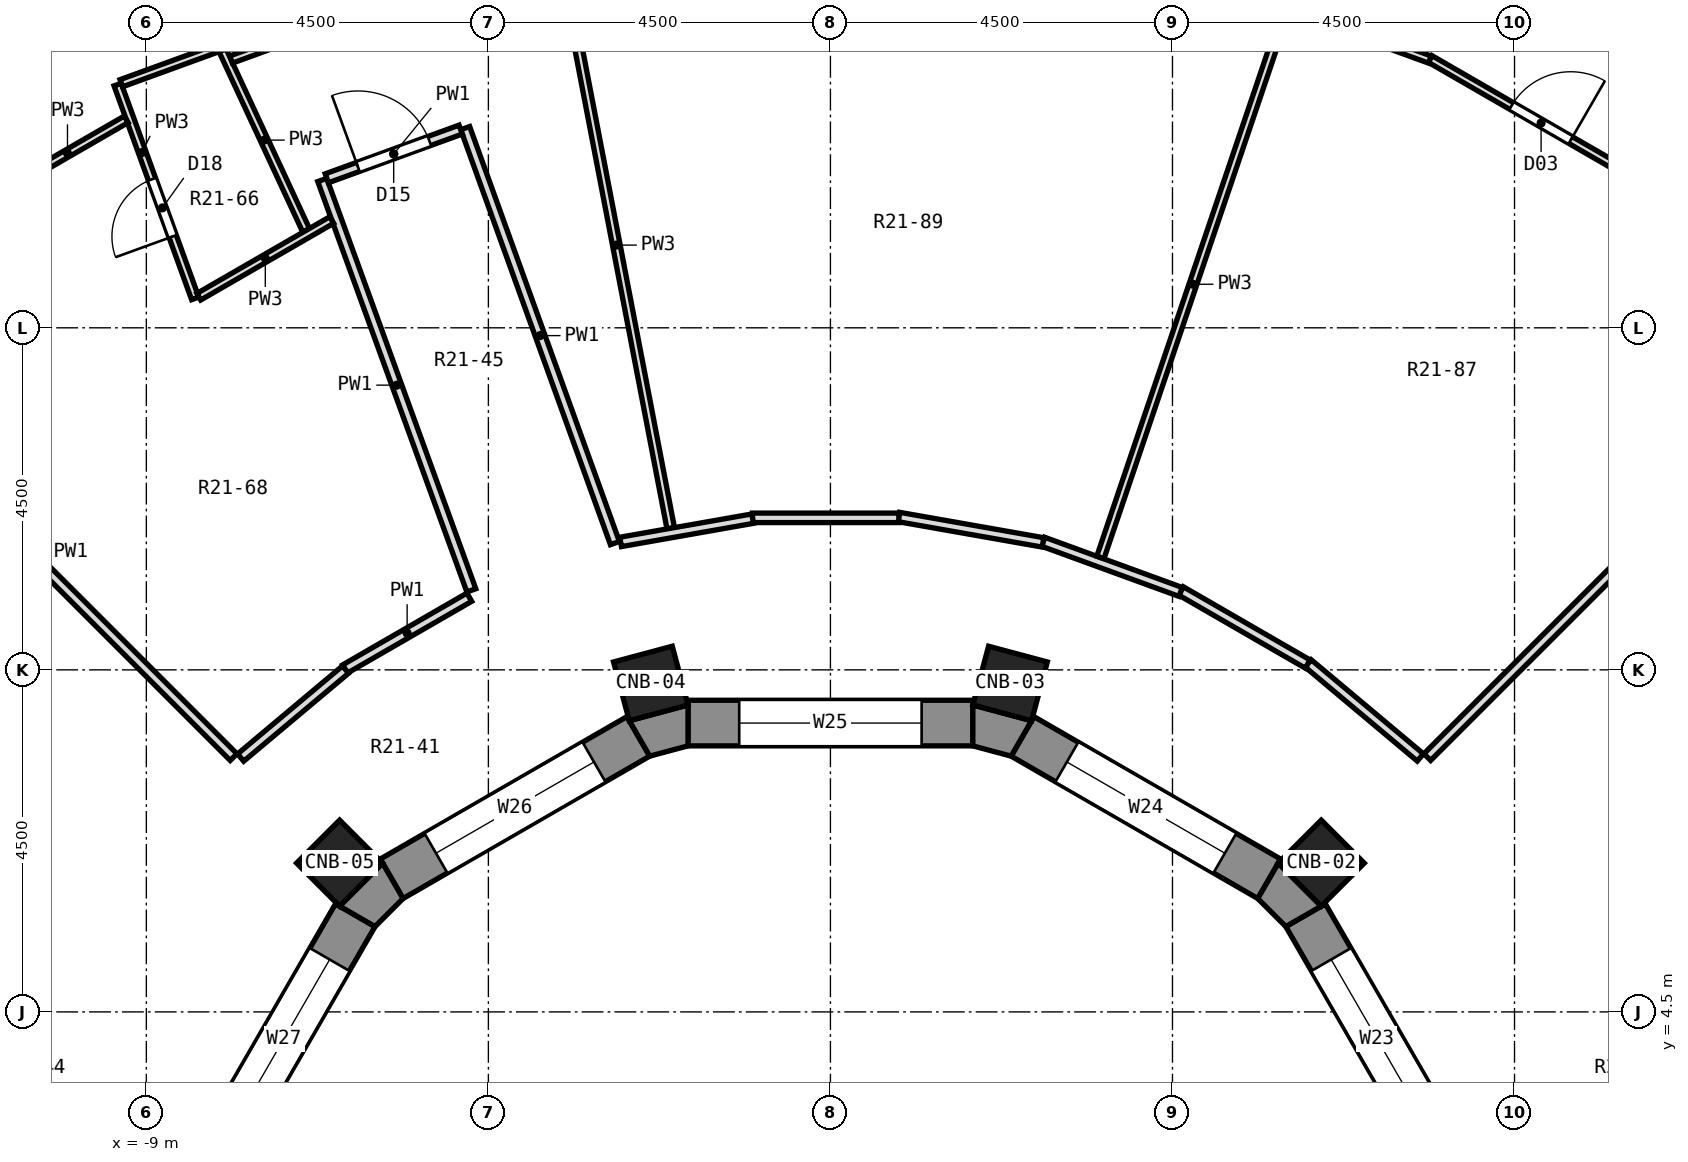
"""IFC4 building model, lengths in metres.
Left out: names, types, materials, properties, quantities, classifications, styles, units other than length and angle.
Written with IfcOpenShell. Run it as: python <this file> out.ifc"""

import sys

from ifc_helpers import new_model, si_unit, direction, frame, frame_2d, origin, origin_2d, place, context, subcontext, project, spatial, polyline, rectangle, outline, extrude, element, fill, save


model = new_model("IFC4")
c1 = context("Model", 3, precision=1e-05, world=origin(), true_north=direction((0.0, 1.0)))
c2 = subcontext(c1, "Body", "Model", "MODEL_VIEW")
j1 = project(units=[si_unit("LENGTHUNIT", "METRE"), si_unit("PLANEANGLEUNIT", "RADIAN")], contexts=[c1])
p1 = place(None, origin())
s1 = spatial("IfcSite", under=j1, at=p1, CompositionType="ELEMENT")
p2 = place(p1, origin())
s2 = spatial("IfcBuilding", under=s1, at=p2, CompositionType="ELEMENT")
p3 = place(p2, frame((0.0, 0.0, 131.5)))
s3 = spatial("IfcBuildingStorey", under=s2, at=p3, CompositionType="ELEMENT", Elevation=131.5)
for number, where, z_axis, x_axis in (
    (1, (6.458, 6.458, 0.0), (0.0, 0.0, 1.0), (0.707, 0.707, 0.0)),
    (2, (2.364, 8.821, 0.0), (0.0, 0.0, 1.0), (0.259, 0.966, 0.0)),
    (3, (-2.364, 8.821, 0.0), (0.0, 0.0, 1.0), (-0.259, 0.966, 0.0)),
    (4, (-6.458, 6.458, 0.0), (0.0, 0.0, 1.0), (-0.707, 0.707, 0.0)),
):
    element("IfcColumn", number, at=place(p3, frame(where, z_axis=z_axis, x_axis=x_axis)), inside=s3, PredefinedType="COLUMN", context=c2, shape_type="SweptSolid", body=[
        extrude(rectangle(XDim=0.8, YDim=0.8, at=origin_2d()), origin(), (0.0, 0.0, 1.0), 3.3),
    ])
p4 = place(p3, frame((8.125, 2.527, 0.0), z_axis=(0.0, 0.0, 1.0), x_axis=(-0.499964958637, 0.86604563398, 0.0)))
e5 = element("IfcWall", 5, at=p4, inside=s3, PredefinedType="SOLIDWALL", context=c2, shape_type="SweptSolid", body=[
    extrude(rectangle(XDim=3.747, YDim=0.6, at=frame_2d((1.874, 0.0))), origin(), (0.0, 0.0, 1.0), 2.8),
])
p5 = place(p4, frame((0.674, 0.0, 0.9)))
e6 = element("IfcOpeningElement", 6, at=p5, cuts=e5, PredefinedType="OPENING", context=c2, shape_type="SweptSolid", body=[
    extrude(rectangle(XDim=2.4, YDim=1.8, at=frame_2d((1.2, 0.9))), frame((0.0, 0.312, 0.0), z_axis=(0.0, -1.0, 0.0), x_axis=(1.0, 0.0, 0.0)), (0.0, 0.0, 1.0), 0.624),
])
p6 = place(p3, frame((5.773, 6.251, 0.0), z_axis=(0.0, 0.0, 1.0), x_axis=(-0.86604563398, 0.499964958637, 0.0)))
e7 = element("IfcWall", 7, at=p6, inside=s3, PredefinedType="SOLIDWALL", context=c2, shape_type="SweptSolid", body=[
    extrude(rectangle(XDim=3.747, YDim=0.6, at=frame_2d((1.874, 0.0))), origin(), (0.0, 0.0, 1.0), 2.8),
])
p7 = place(p6, frame((0.674, 0.0, 0.9)))
e8 = element("IfcOpeningElement", 8, at=p7, cuts=e7, PredefinedType="OPENING", context=c2, shape_type="SweptSolid", body=[
    extrude(rectangle(XDim=2.4, YDim=1.8, at=frame_2d((1.2, 0.9))), frame((0.0, 0.312, 0.0), z_axis=(0.0, -1.0, 0.0), x_axis=(1.0, 0.0, 0.0)), (0.0, 0.0, 1.0), 0.624),
])
p8 = place(p3, frame((1.874, 8.3, 0.0), z_axis=(0.0, 0.0, 1.0), x_axis=(-1.0, 0.0, 0.0)))
e9 = element("IfcWall", 9, at=p8, inside=s3, PredefinedType="SOLIDWALL", context=c2, shape_type="SweptSolid", body=[
    extrude(rectangle(XDim=3.748, YDim=0.6, at=frame_2d((1.874, 0.0))), origin(), (0.0, 0.0, 1.0), 2.8),
])
p9 = place(p8, frame((0.674, 0.0, 0.9)))
e10 = element("IfcOpeningElement", 10, at=p9, cuts=e9, PredefinedType="OPENING", context=c2, shape_type="SweptSolid", body=[
    extrude(rectangle(XDim=2.4, YDim=1.8, at=frame_2d((1.2, 0.9))), frame((0.0, 0.312, 0.0), z_axis=(0.0, -1.0, 0.0), x_axis=(1.0, 0.0, 0.0)), (0.0, 0.0, 1.0), 0.624),
])
p10 = place(p3, frame((-2.527, 8.125, 0.0), z_axis=(0.0, 0.0, 1.0), x_axis=(-0.86604563398, -0.499964958637, 0.0)))
e11 = element("IfcWall", 11, at=p10, inside=s3, PredefinedType="SOLIDWALL", context=c2, shape_type="SweptSolid", body=[
    extrude(rectangle(XDim=3.747, YDim=0.6, at=frame_2d((1.874, 0.0))), origin(), (0.0, 0.0, 1.0), 2.8),
])
p11 = place(p10, frame((0.674, 0.0, 0.9)))
e12 = element("IfcOpeningElement", 12, at=p11, cuts=e11, PredefinedType="OPENING", context=c2, shape_type="SweptSolid", body=[
    extrude(rectangle(XDim=2.4, YDim=1.8, at=frame_2d((1.2, 0.9))), frame((0.0, 0.312, 0.0), z_axis=(0.0, -1.0, 0.0), x_axis=(1.0, 0.0, 0.0)), (0.0, 0.0, 1.0), 0.624),
])
p12 = place(p3, frame((-6.251, 5.773, 0.0), z_axis=(0.0, 0.0, 1.0), x_axis=(-0.499964958637, -0.86604563398, 0.0)))
e13 = element("IfcWall", 13, at=p12, inside=s3, PredefinedType="SOLIDWALL", context=c2, shape_type="SweptSolid", body=[
    extrude(rectangle(XDim=3.747, YDim=0.6, at=frame_2d((1.874, 0.0))), origin(), (0.0, 0.0, 1.0), 2.8),
])
p13 = place(p12, frame((0.674, 0.0, 0.9)))
e14 = element("IfcOpeningElement", 14, at=p13, cuts=e13, PredefinedType="OPENING", context=c2, shape_type="SweptSolid", body=[
    extrude(rectangle(XDim=2.4, YDim=1.8, at=frame_2d((1.2, 0.9))), frame((0.0, 0.312, 0.0), z_axis=(0.0, -1.0, 0.0), x_axis=(1.0, 0.0, 0.0)), (0.0, 0.0, 1.0), 0.624),
])
p14 = place(p3, origin())
e15 = element("IfcWall", 15, at=p14, inside=s3, PredefinedType="SOLIDWALL", context=c2, shape_type="SweptSolid", body=[
    extrude(outline(polyline([(5.892, 6.458), (5.623, 5.991), (5.991, 5.623), (6.458, 5.892), (5.892, 6.458)])), origin(), (0.0, 0.0, 1.0), 2.8),
])
p15 = place(p3, origin())
e16 = element("IfcWall", 16, at=p15, inside=s3, PredefinedType="SOLIDWALL", context=c2, shape_type="SweptSolid", body=[
    extrude(outline(polyline([(1.874, 8.538), (1.874, 8.0), (2.377, 7.865), (2.646, 8.331), (1.874, 8.538)])), origin(), (0.0, 0.0, 1.0), 2.8),
])
p16 = place(p3, origin())
e17 = element("IfcWall", 17, at=p16, inside=s3, PredefinedType="SOLIDWALL", context=c2, shape_type="SweptSolid", body=[
    extrude(outline(polyline([(-2.646, 8.331), (-2.377, 7.865), (-1.874, 8.0), (-1.874, 8.538), (-2.646, 8.331)])), origin(), (0.0, 0.0, 1.0), 2.8),
])
p17 = place(p3, origin())
e18 = element("IfcWall", 18, at=p17, inside=s3, PredefinedType="SOLIDWALL", context=c2, shape_type="SweptSolid", body=[
    extrude(outline(polyline([(-6.458, 5.892), (-5.991, 5.623), (-5.623, 5.991), (-5.892, 6.458), (-6.458, 5.892)])), origin(), (0.0, 0.0, 1.0), 2.8),
])
p18 = place(p3, frame((-3.532, 18.314, 0.0), z_axis=(0.0, 0.0, 1.0), x_axis=(0.188654052272, -0.982043608279, 0.0)))
e19 = element("IfcWall", 19, at=p18, inside=s3, PredefinedType="PARTITIONING", context=c2, shape_type="SweptSolid", body=[
    extrude(rectangle(XDim=7.587, YDim=0.1, at=frame_2d((3.794, 0.0))), origin(), (0.0, 0.0, 1.0), 2.8),
])
p19 = place(p3, frame((-4.805, 16.127, 0.0), z_axis=(0.0, 0.0, 1.0), x_axis=(0.339327115449, -0.940668437188, 0.0)))
e20 = element("IfcWall", 20, at=p19, inside=s3, PredefinedType="PARTITIONING", context=c2, shape_type="SweptSolid", body=[
    extrude(rectangle(XDim=5.804, YDim=0.125, at=frame_2d((2.902, 0.0))), origin(), (0.0, 0.0, 1.0), 2.8),
])
p20 = place(p3, frame((-9.378, 16.7, 0.0), z_axis=(0.0, 0.0, 1.0), x_axis=(0.341009323841, -0.940059913545, 0.0)))
e21 = element("IfcWall", 21, at=p20, inside=s3, PredefinedType="PARTITIONING", context=c2, shape_type="SweptSolid", body=[
    extrude(rectangle(XDim=2.993, YDim=0.1, at=frame_2d((1.496, 0.0))), origin(), (0.0, 0.0, 1.0), 2.8),
])
p21 = place(p20, frame((1.326, 0.0, 0.0)))
e22 = element("IfcOpeningElement", 22, at=p21, cuts=e21, PredefinedType="OPENING", context=c2, shape_type="SweptSolid", body=[
    extrude(rectangle(XDim=0.8, YDim=2.1, at=frame_2d((0.4, 1.05))), frame((0.0, 0.062, 0.0), z_axis=(0.0, -1.0, 0.0), x_axis=(1.0, 0.0, 0.0)), (0.0, 0.0, 1.0), 0.124),
])
p22 = place(p3, frame((-6.686, 15.445, 0.0), z_axis=(0.0, 0.0, 1.0), x_axis=(0.341435936204, -0.939905049177, 0.0)))
e23 = element("IfcWall", 23, at=p22, inside=s3, PredefinedType="PARTITIONING", context=c2, shape_type="SweptSolid", body=[
    extrude(rectangle(XDim=5.745, YDim=0.125, at=frame_2d((2.872, 0.0))), origin(), (0.0, 0.0, 1.0), 2.8),
])
p23 = place(p3, frame((-8.001, 17.158, 0.0), z_axis=(0.0, 0.0, 1.0), x_axis=(0.420966177441, -0.907076334964, 0.0)))
e24 = element("IfcWall", 24, at=p23, inside=s3, PredefinedType="PARTITIONING", context=c2, shape_type="SweptSolid", body=[
    extrude(rectangle(XDim=2.62, YDim=0.1, at=frame_2d((1.31, 0.0))), origin(), (0.0, 0.0, 1.0), 2.8),
])
p24 = place(p3, frame((-13.237, 13.237, 0.0), z_axis=(0.0, 0.0, 1.0), x_axis=(0.707106781187, -0.707106781187, 0.0)))
e25 = element("IfcWall", 25, at=p24, inside=s3, PredefinedType="PARTITIONING", context=c2, shape_type="SweptSolid", body=[
    extrude(rectangle(XDim=7.615, YDim=0.125, at=frame_2d((3.807, 0.0))), origin(), (0.0, 0.0, 1.0), 2.8),
])
p25 = place(p3, frame((6.284, 9.086, 0.0), z_axis=(0.0, 0.0, 1.0), x_axis=(0.766243876147, -0.642549859752, 0.0)))
e26 = element("IfcWall", 26, at=p25, inside=s3, PredefinedType="PARTITIONING", context=c2, shape_type="SweptSolid", body=[
    extrude(rectangle(XDim=1.926, YDim=0.125, at=frame_2d((0.963, 0.0))), origin(), (0.0, 0.0, 1.0), 2.8),
])
p26 = place(p3, frame((4.612, 10.039, 0.0), z_axis=(0.0, 0.0, 1.0), x_axis=(0.865978590021, -0.500081075052, 0.0)))
e27 = element("IfcWall", 27, at=p26, inside=s3, PredefinedType="PARTITIONING", context=c2, shape_type="SweptSolid", body=[
    extrude(rectangle(XDim=1.925, YDim=0.125, at=frame_2d((0.962, 0.0))), origin(), (0.0, 0.0, 1.0), 2.8),
])
p27 = place(p3, frame((7.889, 17.037, 0.0), z_axis=(0.0, 0.0, 1.0), x_axis=(0.866002935623, -0.500038913978, 0.0)))
e28 = element("IfcWall", 28, at=p27, inside=s3, PredefinedType="PARTITIONING", context=c2, shape_type="SweptSolid", body=[
    extrude(rectangle(XDim=3.272, YDim=0.1, at=frame_2d((1.636, 0.0))), origin(), (0.0, 0.0, 1.0), 2.8),
])
p28 = place(p27, frame((1.237, 0.0, 0.0)))
e29 = element("IfcOpeningElement", 29, at=p28, cuts=e28, PredefinedType="OPENING", context=c2, shape_type="SweptSolid", body=[
    extrude(rectangle(XDim=0.9, YDim=2.1, at=frame_2d((0.45, 1.05))), frame((0.0, 0.062, 0.0), z_axis=(0.0, -1.0, 0.0), x_axis=(1.0, 0.0, 0.0)), (0.0, 0.0, 1.0), 0.124),
])
p29 = place(p3, frame((2.798, 10.686, 0.0), z_axis=(0.0, 0.0, 1.0), x_axis=(0.939367042811, -0.34291334019, 0.0)))
e30 = element("IfcWall", 30, at=p29, inside=s3, PredefinedType="PARTITIONING", context=c2, shape_type="SweptSolid", body=[
    extrude(rectangle(XDim=1.926, YDim=0.125, at=frame_2d((0.963, 0.0))), origin(), (0.0, 0.0, 1.0), 2.8),
])
p30 = place(p3, frame((4.81, 18.148, 0.0), z_axis=(0.0, 0.0, 1.0), x_axis=(0.939747677998, -0.341868836979, 0.0)))
e31 = element("IfcWall", 31, at=p30, inside=s3, PredefinedType="PARTITIONING", context=c2, shape_type="SweptSolid", body=[
    extrude(rectangle(XDim=3.273, YDim=0.1, at=frame_2d((1.636, 0.0))), origin(), (0.0, 0.0, 1.0), 2.8),
])
p31 = place(p3, frame((0.899, 11.011, 0.0), z_axis=(0.0, 0.0, 1.0), x_axis=(0.984830733923, -0.173517795977, 0.0)))
e32 = element("IfcWall", 32, at=p31, inside=s3, PredefinedType="PARTITIONING", context=c2, shape_type="SweptSolid", body=[
    extrude(rectangle(XDim=1.926, YDim=0.125, at=frame_2d((0.963, 0.0))), origin(), (0.0, 0.0, 1.0), 2.8),
])
p32 = place(p3, frame((-1.025, 11.0, 0.0), z_axis=(0.0, 0.0, 1.0), x_axis=(1.0, 0.0, 0.0)))
e33 = element("IfcWall", 33, at=p32, inside=s3, PredefinedType="PARTITIONING", context=c2, shape_type="SweptSolid", body=[
    extrude(rectangle(XDim=1.925, YDim=0.125, at=frame_2d((0.962, 0.0))), origin(), (0.0, 0.0, 1.0), 2.8),
])
p33 = place(p3, frame((-2.76, 10.683, 0.0), z_axis=(0.0, 0.0, 1.0), x_axis=(0.98482115855, 0.173572133917, 0.0)))
e34 = element("IfcWall", 34, at=p33, inside=s3, PredefinedType="PARTITIONING", context=c2, shape_type="SweptSolid", body=[
    extrude(rectangle(XDim=1.764, YDim=0.125, at=frame_2d((0.882, 0.0))), origin(), (0.0, 0.0, 1.0), 2.8),
])
p34 = place(p3, frame((-6.625, 15.467, 0.0), z_axis=(0.0, 0.0, 1.0), x_axis=(0.939717302556, 0.341952323105, 0.0)))
e35 = element("IfcWall", 35, at=p34, inside=s3, PredefinedType="PARTITIONING", context=c2, shape_type="SweptSolid", body=[
    extrude(rectangle(XDim=1.874, YDim=0.125, at=frame_2d((0.937, 0.0))), origin(), (0.0, 0.0, 1.0), 2.8),
])
p35 = place(p34, frame((0.436, 0.0, 0.0)))
e36 = element("IfcOpeningElement", 36, at=p35, cuts=e35, PredefinedType="OPENING", context=c2, shape_type="SweptSolid", body=[
    extrude(rectangle(XDim=1.0, YDim=2.1, at=frame_2d((0.5, 1.05))), frame((0.0, 0.074, 0.0), z_axis=(0.0, -1.0, 0.0), x_axis=(1.0, 0.0, 0.0)), (0.0, 0.0, 1.0), 0.149),
])
p36 = place(p3, frame((-7.885, 17.029, 0.0), z_axis=(0.0, 0.0, 1.0), x_axis=(0.939658489008, 0.342113905059, 0.0)))
e37 = element("IfcWall", 37, at=p36, inside=s3, PredefinedType="PARTITIONING", context=c2, shape_type="SweptSolid", body=[
    extrude(rectangle(XDim=3.171, YDim=0.1, at=frame_2d((1.586, 0.0))), origin(), (0.0, 0.0, 1.0), 2.8),
])
p37 = place(p3, frame((-9.329, 16.718, 0.0), z_axis=(0.0, 0.0, 1.0), x_axis=(0.939665632091, 0.342094285054, 0.0)))
e38 = element("IfcWall", 38, at=p37, inside=s3, PredefinedType="PARTITIONING", context=c2, shape_type="SweptSolid", body=[
    extrude(rectangle(XDim=1.395, YDim=0.1, at=frame_2d((0.698, 0.0))), origin(), (0.0, 0.0, 1.0), 2.8),
])
p38 = place(p3, frame((-6.386, 9.011, 0.0), z_axis=(0.0, 0.0, 1.0), x_axis=(0.866006900077, 0.500032047992, 0.0)))
e39 = element("IfcWall", 39, at=p38, inside=s3, PredefinedType="PARTITIONING", context=c2, shape_type="SweptSolid", body=[
    extrude(rectangle(XDim=1.889, YDim=0.125, at=frame_2d((0.944, 0.0))), origin(), (0.0, 0.0, 1.0), 2.8),
])
p39 = place(p3, frame((-8.31, 13.909, 0.0), z_axis=(0.0, 0.0, 1.0), x_axis=(0.866137275136, 0.499806183056, 0.0)))
e40 = element("IfcWall", 40, at=p39, inside=s3, PredefinedType="PARTITIONING", context=c2, shape_type="SweptSolid", body=[
    extrude(rectangle(XDim=2.019, YDim=0.1, at=frame_2d((1.01, 0.0))), origin(), (0.0, 0.0, 1.0), 2.8),
])
p40 = place(p3, frame((-10.81, 15.351, 0.0), z_axis=(0.0, 0.0, 1.0), x_axis=(0.866037519928, 0.499979013637, 0.0)))
e41 = element("IfcWall", 41, at=p40, inside=s3, PredefinedType="PARTITIONING", context=c2, shape_type="SweptSolid", body=[
    extrude(rectangle(XDim=1.785, YDim=0.1, at=frame_2d((0.892, 0.0))), origin(), (0.0, 0.0, 1.0), 2.8),
])
p41 = place(p3, frame((-7.759, 7.846, 0.0), z_axis=(0.0, 0.0, 1.0), x_axis=(0.766228152444, 0.64256860988, 0.0)))
e42 = element("IfcWall", 42, at=p41, inside=s3, PredefinedType="PARTITIONING", context=c2, shape_type="SweptSolid", body=[
    extrude(rectangle(XDim=1.801, YDim=0.125, at=frame_2d((0.9, 0.0))), origin(), (0.0, 0.0, 1.0), 2.8),
])
p42 = place(p3, frame((7.852, 7.852, 0.0), z_axis=(0.0, 0.0, 1.0), x_axis=(0.707106781187, 0.707106781187, 0.0)))
e43 = element("IfcWall", 43, at=p42, inside=s3, PredefinedType="PARTITIONING", context=c2, shape_type="SweptSolid", body=[
    extrude(rectangle(XDim=7.615, YDim=0.125, at=frame_2d((3.807, 0.0))), origin(), (0.0, 0.0, 1.0), 2.8),
])
p43 = place(p3, frame((3.552, 10.48, 0.0), z_axis=(0.0, 0.0, 1.0), x_axis=(0.320895480421, 0.947114613257, 0.0)))
e44 = element("IfcWall", 44, at=p43, inside=s3, PredefinedType="PARTITIONING", context=c2, shape_type="SweptSolid", body=[
    extrude(rectangle(XDim=7.588, YDim=0.1, at=frame_2d((3.794, 0.0))), origin(), (0.0, 0.0, 1.0), 2.8),
])
p44 = place(p5, origin())
e45 = element("IfcWindow", 45, at=p44, inside=s3, PartitioningType="SINGLE_PANEL", PredefinedType="WINDOW", context=c2, shape_type="SweptSolid", body=[
    extrude(rectangle(XDim=2.4, YDim=1.8, at=frame_2d((1.2, 0.9))), frame((0.0, -0.12, 0.0), z_axis=(0.0, -1.0, 0.0), x_axis=(1.0, 0.0, 0.0)), (0.0, 0.0, 1.0), 0.06),
])
fill(e6, e45)
p45 = place(p7, origin())
e46 = element("IfcWindow", 46, at=p45, inside=s3, PartitioningType="SINGLE_PANEL", PredefinedType="WINDOW", context=c2, shape_type="SweptSolid", body=[
    extrude(rectangle(XDim=2.4, YDim=1.8, at=frame_2d((1.2, 0.9))), frame((0.0, -0.12, 0.0), z_axis=(0.0, -1.0, 0.0), x_axis=(1.0, 0.0, 0.0)), (0.0, 0.0, 1.0), 0.06),
])
fill(e8, e46)
p46 = place(p9, origin())
e47 = element("IfcWindow", 47, at=p46, inside=s3, PartitioningType="SINGLE_PANEL", PredefinedType="WINDOW", context=c2, shape_type="SweptSolid", body=[
    extrude(rectangle(XDim=2.4, YDim=1.8, at=frame_2d((1.2, 0.9))), frame((0.0, -0.12, 0.0), z_axis=(0.0, -1.0, 0.0), x_axis=(1.0, 0.0, 0.0)), (0.0, 0.0, 1.0), 0.06),
])
fill(e10, e47)
p47 = place(p11, origin())
e48 = element("IfcWindow", 48, at=p47, inside=s3, PartitioningType="SINGLE_PANEL", PredefinedType="WINDOW", context=c2, shape_type="SweptSolid", body=[
    extrude(rectangle(XDim=2.4, YDim=1.8, at=frame_2d((1.2, 0.9))), frame((0.0, -0.12, 0.0), z_axis=(0.0, -1.0, 0.0), x_axis=(1.0, 0.0, 0.0)), (0.0, 0.0, 1.0), 0.06),
])
fill(e12, e48)
p48 = place(p13, origin())
e49 = element("IfcWindow", 49, at=p48, inside=s3, PartitioningType="SINGLE_PANEL", PredefinedType="WINDOW", context=c2, shape_type="SweptSolid", body=[
    extrude(rectangle(XDim=2.4, YDim=1.8, at=frame_2d((1.2, 0.9))), frame((0.0, -0.12, 0.0), z_axis=(0.0, -1.0, 0.0), x_axis=(1.0, 0.0, 0.0)), (0.0, 0.0, 1.0), 0.06),
])
fill(e14, e49)
p49 = place(p28, origin())
e50 = element("IfcDoor", 50, at=p49, inside=s3, OperationType="SINGLE_SWING_RIGHT", PredefinedType="DOOR", context=c2, shape_type="SweptSolid", body=[
    extrude(rectangle(XDim=0.9, YDim=2.1, at=frame_2d((0.45, 1.05))), frame((0.0, 0.025, 0.0), z_axis=(0.0, -1.0, 0.0), x_axis=(1.0, 0.0, 0.0)), (0.0, 0.0, 1.0), 0.05),
])
fill(e29, e50)
p50 = place(p35, origin())
e51 = element("IfcDoor", 51, at=p50, inside=s3, OperationType="SINGLE_SWING_LEFT", PredefinedType="DOOR", context=c2, shape_type="SweptSolid", body=[
    extrude(rectangle(XDim=1.0, YDim=2.1, at=frame_2d((0.5, 1.05))), frame((0.0, 0.025, 0.0), z_axis=(0.0, -1.0, 0.0), x_axis=(1.0, 0.0, 0.0)), (0.0, 0.0, 1.0), 0.05),
])
fill(e36, e51)
p51 = place(p21, frame((0.8, 0.0, 0.0), z_axis=(0.0, 0.0, 1.0), x_axis=(-1.0, 0.0, 0.0)))
e52 = element("IfcDoor", 52, at=p51, inside=s3, OperationType="SINGLE_SWING_LEFT", PredefinedType="DOOR", context=c2, shape_type="SweptSolid", body=[
    extrude(rectangle(XDim=0.8, YDim=2.1, at=frame_2d((0.4, 1.05))), frame((0.0, 0.025, 0.0), z_axis=(0.0, -1.0, 0.0), x_axis=(1.0, 0.0, 0.0)), (0.0, 0.0, 1.0), 0.05),
])
fill(e22, e52)
save(model, sys.argv[1])
